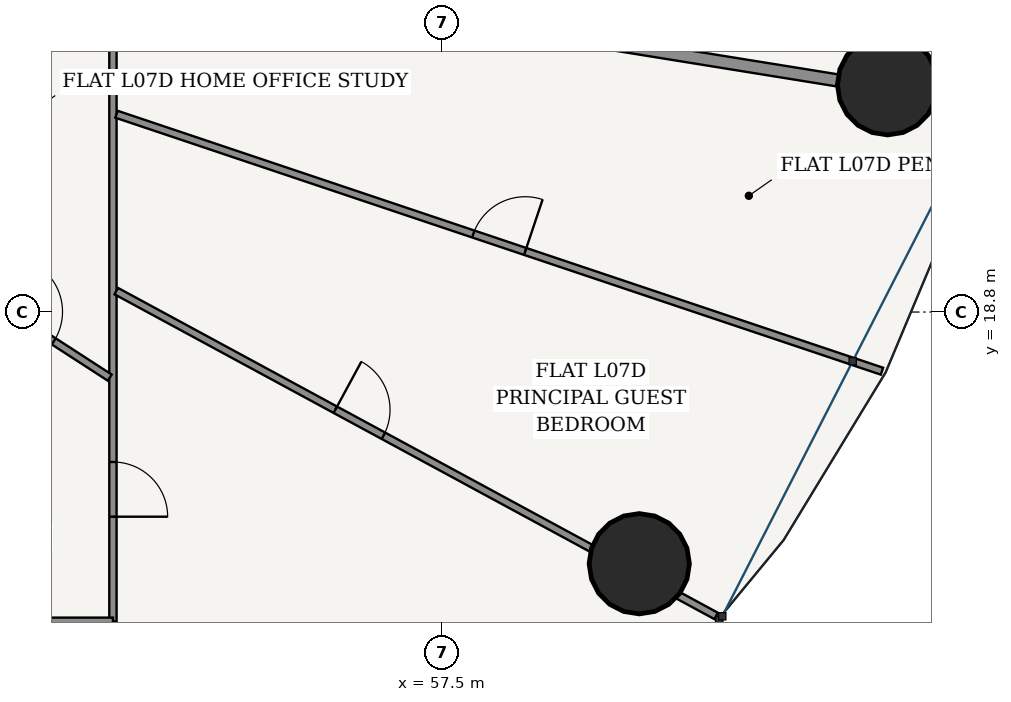
"""IFC4 building model, lengths in metres.
Left out: names, types, materials, properties, quantities, classifications, styles, units other than length and angle.
Written with IfcOpenShell. Run it as: python <this file> out.ifc"""

import sys

from ifc_helpers import new_model, si_unit, direction, frame, frame_2d, origin, origin_2d, place, context, subcontext, project, spatial, rectangle, hollow_circle, extrude, source, transform, mapped, element, fill, save


model = new_model("IFC4")
c1 = context("Model", 3, precision=1e-05, world=origin(), true_north=direction((-0.2419218956, 0.970295726276)))
c2 = subcontext(c1, "Body", "Model", "MODEL_VIEW")
j1 = project(units=[si_unit("LENGTHUNIT", "METRE"), si_unit("PLANEANGLEUNIT", "RADIAN")], contexts=[c1])
p1 = place(None, origin())
s1 = spatial("IfcSite", under=j1, at=p1, CompositionType="ELEMENT")
p2 = place(p1, origin())
s2 = spatial("IfcBuilding", under=s1, at=p2, CompositionType="ELEMENT")
p3 = place(p2, frame((0.0, 0.0, 31.2)))
s3 = spatial("IfcBuildingStorey", under=s2, at=p3, CompositionType="ELEMENT", Elevation=31.2)
for number, where, z_axis, x_axis in (
    (1, (60.741, 14.661, 0.0), (0.0, 0.0, 1.0), (1.0, 0.0, 0.0)),
    (2, (64.824, 22.537, 0.0), (0.0, 0.0, 1.0), (1.0, 0.0, 0.0)),
):
    element("IfcColumn", number, at=place(p3, frame(where, z_axis=z_axis, x_axis=x_axis)), inside=s3, PredefinedType="COLUMN", context=c2, shape_type="SweptSolid", body=[
        extrude(hollow_circle(Radius=0.825, WallThickness=0.05, at=origin_2d()), origin(), (0.0, 0.0, 1.0), 3.6),
    ])
p4 = place(p3, frame((49.435, 24.957, 0.0), z_axis=(0.0, 0.0, 1.0), x_axis=(0.987258195973, -0.159126536076, 0.0)))
e3 = element("IfcWall", 3, at=p4, inside=s3, PredefinedType="PARTITIONING", context=c2, shape_type="SweptSolid", body=[
    extrude(rectangle(XDim=17.105, YDim=0.2, at=frame_2d((8.553, 0.0))), origin(), (0.0, 0.0, 1.0), 2.688),
])
p5 = place(p3, frame((52.085, 24.428, 0.0), z_axis=(0.0, 0.0, 1.0), x_axis=(0.0, -1.0, 0.0)))
e4 = element("IfcWall", 4, at=p5, inside=s3, PredefinedType="PARTITIONING", context=c2, shape_type="SweptSolid", body=[
    extrude(rectangle(XDim=10.713, YDim=0.12, at=frame_2d((5.356, 0.0))), origin(), (0.0, 0.0, 1.0), 2.688),
])
p6 = place(p5, frame((8.094, 0.0, 0.0)))
e5 = element("IfcOpeningElement", 5, at=p6, cuts=e4, PredefinedType="OPENING", context=c2, shape_type="SweptSolid", body=[
    extrude(rectangle(XDim=0.9, YDim=2.15, at=frame_2d((0.45, 1.075))), frame((0.0, 0.07, 0.0), z_axis=(0.0, -1.0, 0.0), x_axis=(1.0, 0.0, 0.0)), (0.0, 0.0, 1.0), 0.14),
])
p7 = place(p3, frame((52.085, 13.715, 0.0), z_axis=(0.0, 0.0, 1.0), x_axis=(-1.0, 0.0, 0.0)))
e6 = element("IfcWall", 6, at=p7, inside=s3, PredefinedType="PARTITIONING", context=c2, shape_type="SweptSolid", body=[
    extrude(rectangle(XDim=17.195, YDim=0.12, at=frame_2d((8.597, 0.0))), origin(), (0.0, 0.0, 1.0), 2.688),
])
p8 = place(p7, frame((9.191, 0.0, 0.0)))
e7 = element("IfcOpeningElement", 7, at=p8, cuts=e6, PredefinedType="OPENING", context=c2, shape_type="SweptSolid", body=[
    extrude(rectangle(XDim=0.9, YDim=2.15, at=frame_2d((0.45, 1.075))), frame((0.0, 0.07, 0.0), z_axis=(0.0, -1.0, 0.0), x_axis=(1.0, 0.0, 0.0)), (0.0, 0.0, 1.0), 0.14),
])
p9 = place(p3, frame((48.829, 13.667, 0.0), z_axis=(0.0, 0.0, 1.0), x_axis=(0.636177533893, -0.771542704826, 0.0)))
e8 = element("IfcWall", 8, at=p9, inside=s3, PredefinedType="PARTITIONING", context=c2, shape_type="SweptSolid", body=[
    extrude(rectangle(XDim=8.187, YDim=0.12, at=frame_2d((4.093, 0.0))), origin(), (0.0, 0.0, 1.0), 2.688),
])
p10 = place(p3, frame((52.139, 19.144, 0.0), z_axis=(0.0, 0.0, 1.0), x_axis=(0.879372452045, -0.476134529922, 0.0)))
e9 = element("IfcWall", 9, at=p10, inside=s3, PredefinedType="PARTITIONING", context=c2, shape_type="SweptSolid", body=[
    extrude(rectangle(XDim=11.219, YDim=0.12, at=frame_2d((5.61, 0.0))), origin(), (0.0, 0.0, 1.0), 2.688),
])
p11 = place(p10, frame((4.097, 0.0, 0.0)))
e10 = element("IfcOpeningElement", 10, at=p11, cuts=e9, PredefinedType="OPENING", context=c2, shape_type="SweptSolid", body=[
    extrude(rectangle(XDim=0.9, YDim=2.15, at=frame_2d((0.45, 1.075))), frame((0.0, 0.07, 0.0), z_axis=(0.0, -1.0, 0.0), x_axis=(1.0, 0.0, 0.0)), (0.0, 0.0, 1.0), 0.14),
])
p12 = place(p3, frame((52.144, 22.052, 0.0), z_axis=(0.0, 0.0, 1.0), x_axis=(0.948023034133, -0.318201707653, 0.0)))
e11 = element("IfcWall", 11, at=p12, inside=s3, PredefinedType="PARTITIONING", context=c2, shape_type="SweptSolid", body=[
    extrude(rectangle(XDim=13.279, YDim=0.12, at=frame_2d((6.639, 0.0))), origin(), (0.0, 0.0, 1.0), 2.762),
])
p13 = place(p12, frame((6.189, 0.0, 0.0)))
e12 = element("IfcOpeningElement", 12, at=p13, cuts=e11, PredefinedType="OPENING", context=c2, shape_type="SweptSolid", body=[
    extrude(rectangle(XDim=0.9, YDim=2.15, at=frame_2d((0.45, 1.075))), frame((0.0, 0.07, 0.0), z_axis=(0.0, -1.0, 0.0), x_axis=(1.0, 0.0, 0.0)), (0.0, 0.0, 1.0), 0.14),
])
p14 = place(p3, frame((49.435, 19.402, 0.0), z_axis=(0.0, 0.0, 1.0), x_axis=(0.839582858019, -0.543231649042, 0.0)))
e13 = element("IfcWall", 13, at=p14, inside=s3, PredefinedType="PARTITIONING", context=c2, shape_type="SweptSolid", body=[
    extrude(rectangle(XDim=3.094, YDim=0.12, at=frame_2d((1.547, 0.0))), origin(), (0.0, 0.0, 1.0), 3.32),
])
p15 = place(p14, frame((1.097, 0.0, 0.0)))
e14 = element("IfcOpeningElement", 14, at=p15, cuts=e13, PredefinedType="OPENING", context=c2, shape_type="SweptSolid", body=[
    extrude(rectangle(XDim=0.9, YDim=2.15, at=frame_2d((0.45, 1.075))), frame((0.0, 0.07, 0.0), z_axis=(0.0, -1.0, 0.0), x_axis=(1.0, 0.0, 0.0)), (0.0, 0.0, 1.0), 0.14),
])
m1 = source(origin(), c2, "Body", "SweptSolid", [
    extrude(rectangle(XDim=0.9, YDim=2.15, at=frame_2d((0.45, 1.075))), frame((0.0, 0.025, 0.0), z_axis=(0.0, -1.0, 0.0), x_axis=(1.0, 0.0, 0.0)), (0.0, 0.0, 1.0), 0.05),
])
p16 = place(p6, origin())
e15 = element("IfcDoor", 15, at=p16, inside=s3, OperationType="SINGLE_SWING_RIGHT", PredefinedType="DOOR", context=c2, shape_type="MappedRepresentation", body=[
    mapped(m1, transform((0.0, 0.0, 0.0), scale=1.0)),
])
fill(e5, e15)
p17 = place(p15, origin())
e16 = element("IfcDoor", 16, at=p17, inside=s3, OperationType="SINGLE_SWING_LEFT", PredefinedType="DOOR", context=c2, shape_type="MappedRepresentation", body=[
    mapped(m1, transform((0.0, 0.0, 0.0), scale=1.0)),
])
fill(e14, e16)
p18 = place(p11, origin())
e17 = element("IfcDoor", 17, at=p18, inside=s3, OperationType="SINGLE_SWING_LEFT", PredefinedType="DOOR", context=c2, shape_type="MappedRepresentation", body=[
    mapped(m1, transform((0.0, 0.0, 0.0), scale=1.0)),
])
fill(e10, e17)
p19 = place(p13, origin())
e18 = element("IfcDoor", 18, at=p19, inside=s3, OperationType="SINGLE_SWING_RIGHT", PredefinedType="DOOR", context=c2, shape_type="MappedRepresentation", body=[
    mapped(m1, transform((0.0, 0.0, 0.0), scale=1.0)),
])
fill(e12, e18)
save(model, sys.argv[1])
